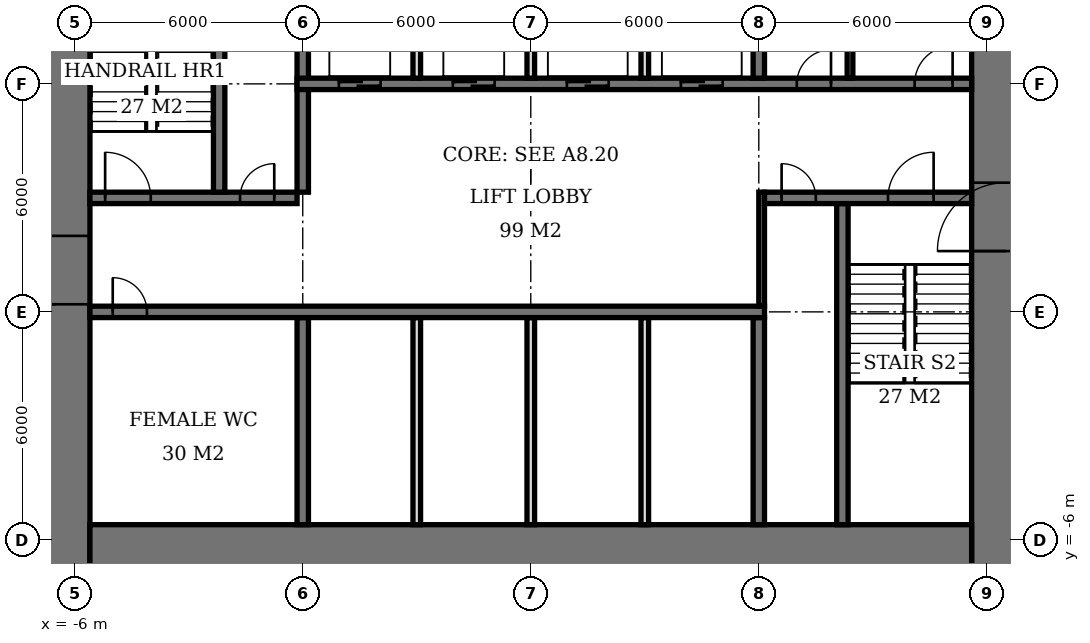
"""IFC4 building model, lengths in metres.
Left out: names, types, materials, properties, quantities, classifications, styles, units other than length and angle.
Written with IfcOpenShell. Run it as: python <this file> out.ifc"""

import sys

from ifc_helpers import new_model, si_unit, direction, frame, frame_2d, origin, place, context, subcontext, project, spatial, rectangle, extrude, element, fill, save


model = new_model("IFC4")
c1 = context("Model", 3, precision=1e-05, world=origin(), true_north=direction((0.0, 1.0)))
c2 = subcontext(c1, "Body", "Model", "MODEL_VIEW")
j1 = project(units=[si_unit("LENGTHUNIT", "METRE"), si_unit("PLANEANGLEUNIT", "RADIAN")], contexts=[c1])
p1 = place(None, origin())
s1 = spatial("IfcSite", under=j1, at=p1, CompositionType="ELEMENT")
p2 = place(p1, origin())
s2 = spatial("IfcBuilding", under=s1, at=p2, CompositionType="ELEMENT")
p3 = place(p2, frame((0.0, 0.0, -4.5)))
s3 = spatial("IfcBuildingStorey", under=s2, at=p3, CompositionType="ELEMENT", Elevation=-4.5)
p4 = place(p3, frame((-5.6, -6.6, 0.0), z_axis=(0.0, 0.0, 1.0), x_axis=(1.0, 0.0, 0.0)))
e1 = element("IfcWall", 1, at=p4, inside=s3, PredefinedType="SHEAR", context=c2, shape_type="SweptSolid", body=[
    extrude(rectangle(XDim=23.2, YDim=2.0, at=frame_2d((11.6, 0.0))), origin(), (0.0, 0.0, 1.0), 4.5),
])
p5 = place(p3, frame((-6.5, -7.6, 0.0), z_axis=(0.0, 0.0, 1.0), x_axis=(0.0, 1.0, 0.0)))
e2 = element("IfcWall", 2, at=p5, inside=s3, PredefinedType="SHEAR", context=c2, shape_type="SweptSolid", body=[
    extrude(rectangle(XDim=21.2, YDim=1.8, at=frame_2d((10.6, 0.0))), origin(), (0.0, 0.0, 1.0), 4.5),
])
p6 = place(p5, frame((7.8, 0.0, 0.0)))
e3 = element("IfcOpeningElement", 3, at=p6, cuts=e2, PredefinedType="OPENING", context=c2, shape_type="SweptSolid", body=[
    extrude(rectangle(XDim=1.8, YDim=2.4, at=frame_2d((0.9, 1.2))), frame((0.0, 0.91, 0.0), z_axis=(0.0, -1.0, 0.0), x_axis=(1.0, 0.0, 0.0)), (0.0, 0.0, 1.0), 1.82),
])
p7 = place(p3, frame((18.5, -7.6, 0.0), z_axis=(0.0, 0.0, 1.0), x_axis=(0.0, 1.0, 0.0)))
e4 = element("IfcWall", 4, at=p7, inside=s3, PredefinedType="SHEAR", context=c2, shape_type="SweptSolid", body=[
    extrude(rectangle(XDim=21.2, YDim=1.8, at=frame_2d((10.6, 0.0))), origin(), (0.0, 0.0, 1.0), 4.5),
])
p8 = place(p7, frame((9.2, 0.0, 0.0)))
e5 = element("IfcOpeningElement", 5, at=p8, cuts=e4, PredefinedType="OPENING", context=c2, shape_type="SweptSolid", body=[
    extrude(rectangle(XDim=1.8, YDim=2.4, at=frame_2d((0.9, 1.2))), frame((0.0, 0.91, 0.0), z_axis=(0.0, -1.0, 0.0), x_axis=(1.0, 0.0, 0.0)), (0.0, 0.0, 1.0), 1.82),
])
p9 = place(p3, frame((-5.6, 0.0, 0.0), z_axis=(0.0, 0.0, 1.0), x_axis=(1.0, 0.0, 0.0)))
e6 = element("IfcWall", 6, at=p9, inside=s3, PredefinedType="SHEAR", context=c2, shape_type="SweptSolid", body=[
    extrude(rectangle(XDim=17.75, YDim=0.3, at=frame_2d((8.875, 0.0))), origin(), (0.0, 0.0, 1.0), 4.5),
])
p10 = place(p9, frame((0.6, 0.0, 0.0)))
e7 = element("IfcOpeningElement", 7, at=p10, cuts=e6, PredefinedType="OPENING", context=c2, shape_type="SweptSolid", body=[
    extrude(rectangle(XDim=0.9, YDim=2.1, at=frame_2d((0.45, 1.05))), frame((0.0, 0.16, 0.0), z_axis=(0.0, -1.0, 0.0), x_axis=(1.0, 0.0, 0.0)), (0.0, 0.0, 1.0), 0.32),
])
p11 = place(p3, frame((-5.6, 3.0, 0.0), z_axis=(0.0, 0.0, 1.0), x_axis=(1.0, 0.0, 0.0)))
e8 = element("IfcWall", 8, at=p11, inside=s3, PredefinedType="SHEAR", context=c2, shape_type="SweptSolid", body=[
    extrude(rectangle(XDim=5.45, YDim=0.3, at=frame_2d((2.725, 0.0))), origin(), (0.0, 0.0, 1.0), 4.5),
])
p12 = place(p11, frame((0.4, 0.0, 0.0)))
e9 = element("IfcOpeningElement", 9, at=p12, cuts=e8, PredefinedType="OPENING", context=c2, shape_type="SweptSolid", body=[
    extrude(rectangle(XDim=1.2, YDim=2.1, at=frame_2d((0.6, 1.05))), frame((0.0, 0.16, 0.0), z_axis=(0.0, -1.0, 0.0), x_axis=(1.0, 0.0, 0.0)), (0.0, 0.0, 1.0), 0.32),
])
p13 = place(p11, frame((3.95, 0.0, 0.0)))
e10 = element("IfcOpeningElement", 10, at=p13, cuts=e8, PredefinedType="OPENING", context=c2, shape_type="SweptSolid", body=[
    extrude(rectangle(XDim=0.9, YDim=2.1, at=frame_2d((0.45, 1.05))), frame((0.0, 0.16, 0.0), z_axis=(0.0, -1.0, 0.0), x_axis=(1.0, 0.0, 0.0)), (0.0, 0.0, 1.0), 0.32),
])
p14 = place(p3, frame((12.15, 3.0, 0.0), z_axis=(0.0, 0.0, 1.0), x_axis=(1.0, 0.0, 0.0)))
e11 = element("IfcWall", 11, at=p14, inside=s3, PredefinedType="SHEAR", context=c2, shape_type="SweptSolid", body=[
    extrude(rectangle(XDim=5.45, YDim=0.3, at=frame_2d((2.725, 0.0))), origin(), (0.0, 0.0, 1.0), 4.5),
])
p15 = place(p14, frame((3.25, 0.0, 0.0)))
e12 = element("IfcOpeningElement", 12, at=p15, cuts=e11, PredefinedType="OPENING", context=c2, shape_type="SweptSolid", body=[
    extrude(rectangle(XDim=1.2, YDim=2.1, at=frame_2d((0.6, 1.05))), frame((0.0, 0.16, 0.0), z_axis=(0.0, -1.0, 0.0), x_axis=(1.0, 0.0, 0.0)), (0.0, 0.0, 1.0), 0.32),
])
p16 = place(p14, frame((0.45, 0.0, 0.0)))
e13 = element("IfcOpeningElement", 13, at=p16, cuts=e11, PredefinedType="OPENING", context=c2, shape_type="SweptSolid", body=[
    extrude(rectangle(XDim=0.9, YDim=2.1, at=frame_2d((0.45, 1.05))), frame((0.0, 0.16, 0.0), z_axis=(0.0, -1.0, 0.0), x_axis=(1.0, 0.0, 0.0)), (0.0, 0.0, 1.0), 0.32),
])
p17 = place(p3, frame((-0.15, 6.0, 0.0), z_axis=(0.0, 0.0, 1.0), x_axis=(1.0, 0.0, 0.0)))
e14 = element("IfcWall", 14, at=p17, inside=s3, PredefinedType="SHEAR", context=c2, shape_type="SweptSolid", body=[
    extrude(rectangle(XDim=17.75, YDim=0.3, at=frame_2d((8.875, 0.0))), origin(), (0.0, 0.0, 1.0), 4.5),
])
p18 = place(p17, frame((13.15, 0.0, 0.0)))
e15 = element("IfcOpeningElement", 15, at=p18, cuts=e14, PredefinedType="OPENING", context=c2, shape_type="SweptSolid", body=[
    extrude(rectangle(XDim=0.9, YDim=2.1, at=frame_2d((0.45, 1.05))), frame((0.0, 0.16, 0.0), z_axis=(0.0, -1.0, 0.0), x_axis=(1.0, 0.0, 0.0)), (0.0, 0.0, 1.0), 0.32),
])
p19 = place(p17, frame((16.25, 0.0, 0.0)))
e16 = element("IfcOpeningElement", 16, at=p19, cuts=e14, PredefinedType="OPENING", context=c2, shape_type="SweptSolid", body=[
    extrude(rectangle(XDim=1.0, YDim=2.1, at=frame_2d((0.5, 1.05))), frame((0.0, 0.16, 0.0), z_axis=(0.0, -1.0, 0.0), x_axis=(1.0, 0.0, 0.0)), (0.0, 0.0, 1.0), 0.32),
])
p20 = place(p17, frame((1.1, 0.0, 0.0)))
e17 = element("IfcOpeningElement", 17, at=p20, cuts=e14, PredefinedType="OPENING", context=c2, shape_type="SweptSolid", body=[
    extrude(rectangle(XDim=1.1, YDim=2.1, at=frame_2d((0.55, 1.05))), frame((0.0, 0.16, 0.0), z_axis=(0.0, -1.0, 0.0), x_axis=(1.0, 0.0, 0.0)), (0.0, 0.0, 1.0), 0.32),
])
p21 = place(p17, frame((4.1, 0.0, 0.0)))
e18 = element("IfcOpeningElement", 18, at=p21, cuts=e14, PredefinedType="OPENING", context=c2, shape_type="SweptSolid", body=[
    extrude(rectangle(XDim=1.1, YDim=2.1, at=frame_2d((0.55, 1.05))), frame((0.0, 0.16, 0.0), z_axis=(0.0, -1.0, 0.0), x_axis=(1.0, 0.0, 0.0)), (0.0, 0.0, 1.0), 0.32),
])
p22 = place(p17, frame((7.1, 0.0, 0.0)))
e19 = element("IfcOpeningElement", 19, at=p22, cuts=e14, PredefinedType="OPENING", context=c2, shape_type="SweptSolid", body=[
    extrude(rectangle(XDim=1.1, YDim=2.1, at=frame_2d((0.55, 1.05))), frame((0.0, 0.16, 0.0), z_axis=(0.0, -1.0, 0.0), x_axis=(1.0, 0.0, 0.0)), (0.0, 0.0, 1.0), 0.32),
])
p23 = place(p17, frame((10.1, 0.0, 0.0)))
e20 = element("IfcOpeningElement", 20, at=p23, cuts=e14, PredefinedType="OPENING", context=c2, shape_type="SweptSolid", body=[
    extrude(rectangle(XDim=1.1, YDim=2.1, at=frame_2d((0.55, 1.05))), frame((0.0, 0.16, 0.0), z_axis=(0.0, -1.0, 0.0), x_axis=(1.0, 0.0, 0.0)), (0.0, 0.0, 1.0), 0.32),
])
p24 = place(p3, frame((0.0, -5.6, 0.0), z_axis=(0.0, 0.0, 1.0), x_axis=(0.0, 1.0, 0.0)))
e21 = element("IfcWall", 21, at=p24, inside=s3, PredefinedType="SHEAR", context=c2, shape_type="SweptSolid", body=[
    extrude(rectangle(XDim=5.45, YDim=0.3, at=frame_2d((2.725, 0.0))), origin(), (0.0, 0.0, 1.0), 4.5),
])
p25 = place(p3, frame((0.0, 3.15, 0.0), z_axis=(0.0, 0.0, 1.0), x_axis=(0.0, 1.0, 0.0)))
e22 = element("IfcWall", 22, at=p25, inside=s3, PredefinedType="SHEAR", context=c2, shape_type="SweptSolid", body=[
    extrude(rectangle(XDim=8.45, YDim=0.3, at=frame_2d((4.225, 0.0))), origin(), (0.0, 0.0, 1.0), 4.5),
])
for number, where, z_axis, x_axis in (
    (23, (12.0, -5.6, 0.0), (0.0, 0.0, 1.0), (0.0, 1.0, 0.0)),
    (24, (12.0, 6.15, 0.0), (0.0, 0.0, 1.0), (0.0, 1.0, 0.0)),
):
    element("IfcWall", number, at=place(p3, frame(where, z_axis=z_axis, x_axis=x_axis)), inside=s3, PredefinedType="SHEAR", context=c2, shape_type="SweptSolid", body=[
        extrude(rectangle(XDim=5.45, YDim=0.3, at=frame_2d((2.725, 0.0))), origin(), (0.0, 0.0, 1.0), 4.5),
    ])
for number, where, z_axis, x_axis in (
    (25, (-2.2, 3.15, 0.0), (0.0, 0.0, 1.0), (0.0, 1.0, 0.0)),
    (26, (14.2, -5.6, 0.0), (0.0, 0.0, 1.0), (0.0, 1.0, 0.0)),
):
    element("IfcWall", number, at=place(p3, frame(where, z_axis=z_axis, x_axis=x_axis)), inside=s3, PredefinedType="SHEAR", context=c2, shape_type="SweptSolid", body=[
        extrude(rectangle(XDim=8.45, YDim=0.3, at=frame_2d((4.225, 0.0))), origin(), (0.0, 0.0, 1.0), 4.5),
    ])
for number, where, z_axis, x_axis in (
    (27, (3.0, 6.15, 0.0), (0.0, 0.0, 1.0), (0.0, 1.0, 0.0)),
    (28, (6.0, 6.15, 0.0), (0.0, 0.0, 1.0), (0.0, 1.0, 0.0)),
    (29, (9.0, 6.15, 0.0), (0.0, 0.0, 1.0), (0.0, 1.0, 0.0)),
    (30, (3.0, -5.6, 0.0), (0.0, 0.0, 1.0), (0.0, 1.0, 0.0)),
    (31, (6.0, -5.6, 0.0), (0.0, 0.0, 1.0), (0.0, 1.0, 0.0)),
    (32, (9.0, -5.6, 0.0), (0.0, 0.0, 1.0), (0.0, 1.0, 0.0)),
):
    element("IfcWall", number, at=place(p3, frame(where, z_axis=z_axis, x_axis=x_axis)), inside=s3, PredefinedType="SOLIDWALL", context=c2, shape_type="SweptSolid", body=[
        extrude(rectangle(XDim=5.45, YDim=0.2, at=frame_2d((2.725, 0.0))), origin(), (0.0, 0.0, 1.0), 4.5),
    ])
p26 = place(p3, frame((14.4, 6.15, 0.0), z_axis=(0.0, 0.0, 1.0), x_axis=(0.0, 1.0, 0.0)))
e33 = element("IfcWall", 33, at=p26, inside=s3, PredefinedType="PLUMBINGWALL", context=c2, shape_type="SweptSolid", body=[
    extrude(rectangle(XDim=5.45, YDim=0.15, at=frame_2d((2.725, 0.0))), origin(), (0.0, 0.0, 1.0), 4.05),
])
p27 = place(p3, frame((12.075, 0.15, 0.0), z_axis=(0.0, 0.0, 1.0), x_axis=(0.0, 1.0, 0.0)))
e34 = element("IfcWall", 34, at=p27, inside=s3, PredefinedType="PARTITIONING", context=c2, shape_type="SweptSolid", body=[
    extrude(rectangle(XDim=3.0, YDim=0.15, at=frame_2d((1.5, 0.0))), origin(), (0.0, 0.0, 1.0), 4.05),
])
p28 = place(p6, origin())
e35 = element("IfcDoor", 35, at=p28, inside=s3, OperationType="DOUBLE_DOOR_SINGLE_SWING", PredefinedType="DOOR", context=c2, shape_type="SweptSolid", body=[
    extrude(rectangle(XDim=1.8, YDim=2.4, at=frame_2d((0.9, 1.2))), frame((0.0, 0.025, 0.0), z_axis=(0.0, -1.0, 0.0), x_axis=(1.0, 0.0, 0.0)), (0.0, 0.0, 1.0), 0.05),
])
fill(e3, e35)
p29 = place(p8, origin())
e36 = element("IfcDoor", 36, at=p29, inside=s3, OperationType="DOUBLE_DOOR_SINGLE_SWING", PredefinedType="DOOR", context=c2, shape_type="SweptSolid", body=[
    extrude(rectangle(XDim=1.8, YDim=2.4, at=frame_2d((0.9, 1.2))), frame((0.0, 0.025, 0.0), z_axis=(0.0, -1.0, 0.0), x_axis=(1.0, 0.0, 0.0)), (0.0, 0.0, 1.0), 0.05),
])
fill(e5, e36)
p30 = place(p12, origin())
e37 = element("IfcDoor", 37, at=p30, inside=s3, OperationType="SINGLE_SWING_LEFT", PredefinedType="DOOR", context=c2, shape_type="SweptSolid", body=[
    extrude(rectangle(XDim=1.2, YDim=2.1, at=frame_2d((0.6, 1.05))), frame((0.0, 0.025, 0.0), z_axis=(0.0, -1.0, 0.0), x_axis=(1.0, 0.0, 0.0)), (0.0, 0.0, 1.0), 0.05),
])
fill(e9, e37)
p31 = place(p13, origin())
e38 = element("IfcDoor", 38, at=p31, inside=s3, OperationType="SINGLE_SWING_RIGHT", PredefinedType="DOOR", context=c2, shape_type="SweptSolid", body=[
    extrude(rectangle(XDim=0.9, YDim=2.1, at=frame_2d((0.45, 1.05))), frame((0.0, 0.025, 0.0), z_axis=(0.0, -1.0, 0.0), x_axis=(1.0, 0.0, 0.0)), (0.0, 0.0, 1.0), 0.05),
])
fill(e10, e38)
p32 = place(p15, origin())
e39 = element("IfcDoor", 39, at=p32, inside=s3, OperationType="SINGLE_SWING_RIGHT", PredefinedType="DOOR", context=c2, shape_type="SweptSolid", body=[
    extrude(rectangle(XDim=1.2, YDim=2.1, at=frame_2d((0.6, 1.05))), frame((0.0, 0.025, 0.0), z_axis=(0.0, -1.0, 0.0), x_axis=(1.0, 0.0, 0.0)), (0.0, 0.0, 1.0), 0.05),
])
fill(e12, e39)
p33 = place(p16, origin())
e40 = element("IfcDoor", 40, at=p33, inside=s3, OperationType="SINGLE_SWING_LEFT", PredefinedType="DOOR", context=c2, shape_type="SweptSolid", body=[
    extrude(rectangle(XDim=0.9, YDim=2.1, at=frame_2d((0.45, 1.05))), frame((0.0, 0.025, 0.0), z_axis=(0.0, -1.0, 0.0), x_axis=(1.0, 0.0, 0.0)), (0.0, 0.0, 1.0), 0.05),
])
fill(e13, e40)
p34 = place(p10, origin())
e41 = element("IfcDoor", 41, at=p34, inside=s3, OperationType="SINGLE_SWING_LEFT", PredefinedType="DOOR", context=c2, shape_type="SweptSolid", body=[
    extrude(rectangle(XDim=0.9, YDim=2.1, at=frame_2d((0.45, 1.05))), frame((0.0, 0.025, 0.0), z_axis=(0.0, -1.0, 0.0), x_axis=(1.0, 0.0, 0.0)), (0.0, 0.0, 1.0), 0.05),
])
fill(e7, e41)
p35 = place(p18, origin())
e42 = element("IfcDoor", 42, at=p35, inside=s3, OperationType="SINGLE_SWING_RIGHT", PredefinedType="DOOR", context=c2, shape_type="SweptSolid", body=[
    extrude(rectangle(XDim=0.9, YDim=2.1, at=frame_2d((0.45, 1.05))), frame((0.0, 0.025, 0.0), z_axis=(0.0, -1.0, 0.0), x_axis=(1.0, 0.0, 0.0)), (0.0, 0.0, 1.0), 0.05),
])
fill(e15, e42)
p36 = place(p19, origin())
e43 = element("IfcDoor", 43, at=p36, inside=s3, OperationType="SINGLE_SWING_RIGHT", PredefinedType="DOOR", context=c2, shape_type="SweptSolid", body=[
    extrude(rectangle(XDim=1.0, YDim=2.1, at=frame_2d((0.5, 1.05))), frame((0.0, 0.025, 0.0), z_axis=(0.0, -1.0, 0.0), x_axis=(1.0, 0.0, 0.0)), (0.0, 0.0, 1.0), 0.05),
])
fill(e16, e43)
p37 = place(p20, origin())
e44 = element("IfcDoor", 44, at=p37, inside=s3, OperationType="DOUBLE_DOOR_SLIDING", PredefinedType="USERDEFINED", context=c2, shape_type="SweptSolid", body=[
    extrude(rectangle(XDim=1.1, YDim=2.1, at=frame_2d((0.55, 1.05))), frame((0.0, 0.025, 0.0), z_axis=(0.0, -1.0, 0.0), x_axis=(1.0, 0.0, 0.0)), (0.0, 0.0, 1.0), 0.05),
])
fill(e17, e44)
p38 = place(p21, origin())
e45 = element("IfcDoor", 45, at=p38, inside=s3, OperationType="DOUBLE_DOOR_SLIDING", PredefinedType="USERDEFINED", context=c2, shape_type="SweptSolid", body=[
    extrude(rectangle(XDim=1.1, YDim=2.1, at=frame_2d((0.55, 1.05))), frame((0.0, 0.025, 0.0), z_axis=(0.0, -1.0, 0.0), x_axis=(1.0, 0.0, 0.0)), (0.0, 0.0, 1.0), 0.05),
])
fill(e18, e45)
p39 = place(p22, origin())
e46 = element("IfcDoor", 46, at=p39, inside=s3, OperationType="DOUBLE_DOOR_SLIDING", PredefinedType="USERDEFINED", context=c2, shape_type="SweptSolid", body=[
    extrude(rectangle(XDim=1.1, YDim=2.1, at=frame_2d((0.55, 1.05))), frame((0.0, 0.025, 0.0), z_axis=(0.0, -1.0, 0.0), x_axis=(1.0, 0.0, 0.0)), (0.0, 0.0, 1.0), 0.05),
])
fill(e19, e46)
p40 = place(p23, origin())
e47 = element("IfcDoor", 47, at=p40, inside=s3, OperationType="DOUBLE_DOOR_SLIDING", PredefinedType="USERDEFINED", context=c2, shape_type="SweptSolid", body=[
    extrude(rectangle(XDim=1.1, YDim=2.1, at=frame_2d((0.55, 1.05))), frame((0.0, 0.025, 0.0), z_axis=(0.0, -1.0, 0.0), x_axis=(1.0, 0.0, 0.0)), (0.0, 0.0, 1.0), 0.05),
])
fill(e20, e47)
save(model, sys.argv[1])
